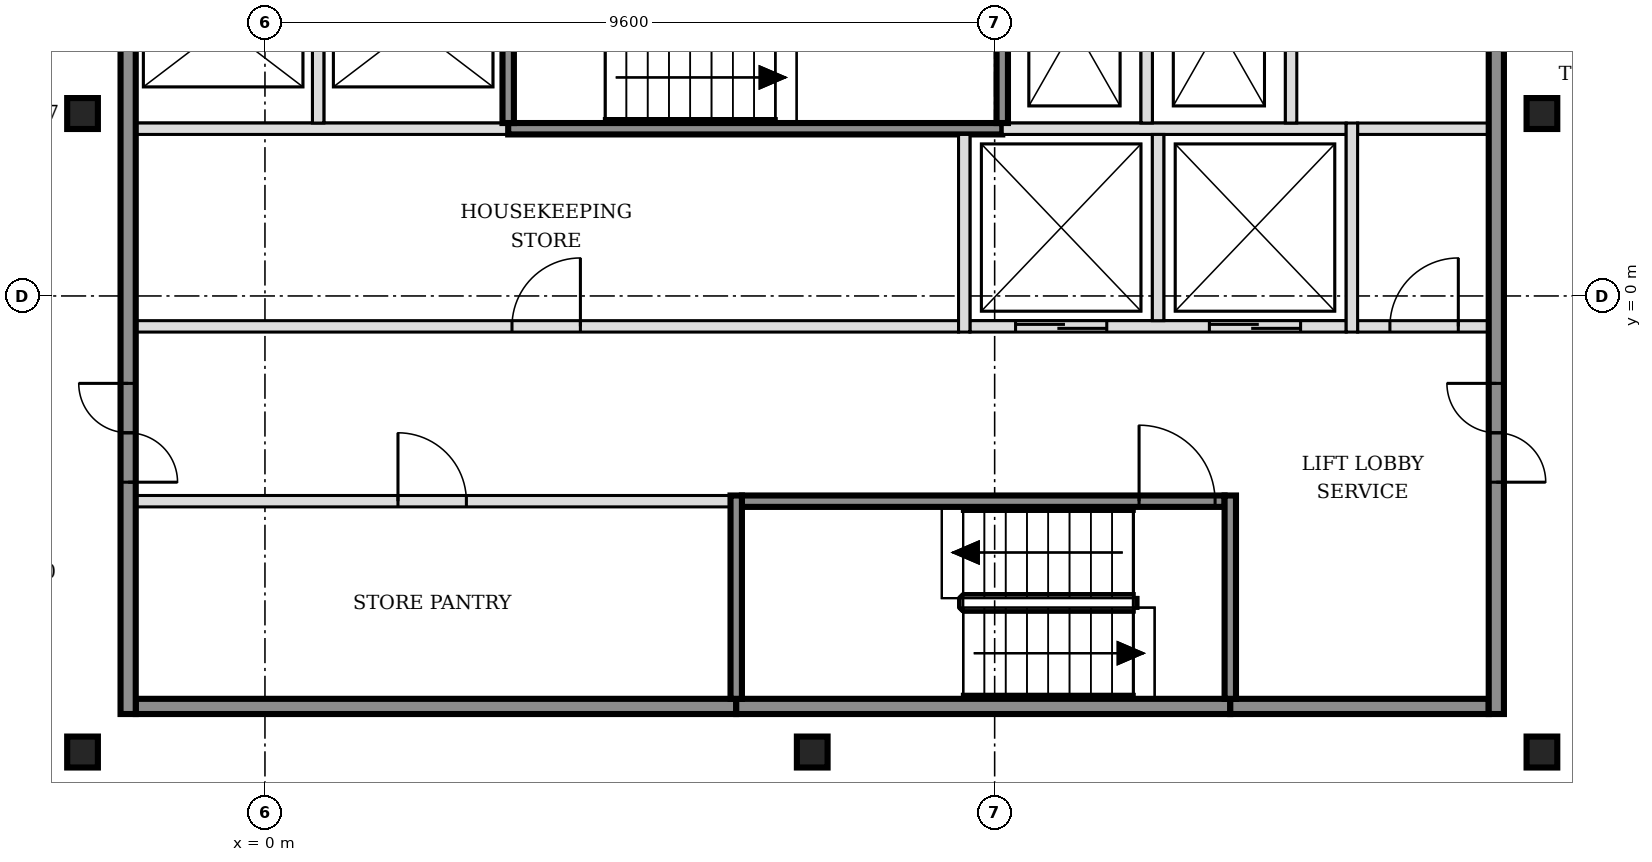
"""IFC4 building model, lengths in metres.
Left out: names, types, materials, properties, quantities, classifications, styles, units other than length and angle.
Written with IfcOpenShell. Run it as: python <this file> out.ifc"""

import sys

from ifc_helpers import new_model, si_unit, direction, frame, frame_2d, origin, origin_2d, place, context, subcontext, project, spatial, rectangle, i_section, extrude, element, fill, save


model = new_model("IFC4")
c1 = context("Model", 3, precision=1e-05, world=origin(), true_north=direction((0.0, 1.0)))
c2 = subcontext(c1, "Body", "Model", "MODEL_VIEW")
j1 = project(units=[si_unit("LENGTHUNIT", "METRE"), si_unit("PLANEANGLEUNIT", "RADIAN")], contexts=[c1])
p1 = place(None, origin())
s1 = spatial("IfcSite", under=j1, at=p1, CompositionType="ELEMENT")
p2 = place(p1, origin())
s2 = spatial("IfcBuilding", under=s1, at=p2, CompositionType="ELEMENT")
p3 = place(p2, frame((0.0, 0.0, 204.6)))
s3 = spatial("IfcBuildingStorey", under=s2, at=p3, CompositionType="ELEMENT", Elevation=204.6)
for number, where, z_axis, x_axis in (
    (1, (-2.4, -6.0, -0.25), (0.0, 0.0, 1.0), (1.0, 0.0, 0.0)),
    (2, (7.2, -6.0, -0.25), (0.0, 0.0, 1.0), (1.0, 0.0, 0.0)),
    (3, (16.8, -6.0, -0.25), (0.0, 0.0, 1.0), (1.0, 0.0, 0.0)),
    (4, (-2.4, 2.4, -0.25), (0.0, 0.0, 1.0), (1.0, 0.0, 0.0)),
    (5, (16.8, 2.4, -0.25), (0.0, 0.0, 1.0), (1.0, 0.0, 0.0)),
):
    element("IfcColumn", number, at=place(p3, frame(where, z_axis=z_axis, x_axis=x_axis)), inside=s3, PredefinedType="COLUMN", context=c2, shape_type="SweptSolid", body=[
        extrude(i_section(OverallWidth=0.404, OverallDepth=0.407, WebThickness=0.027, FlangeThickness=0.044, FilletRadius=0.015, at=origin_2d()), origin(), (0.0, 0.0, 1.0), 6.1),
    ])
p4 = place(p3, frame((-1.7, -5.4, 0.0), z_axis=(0.0, 0.0, 1.0), x_axis=(1.0, 0.0, 0.0)))
e6 = element("IfcWall", 6, at=p4, inside=s3, PredefinedType="SOLIDWALL", context=c2, shape_type="SweptSolid", body=[
    extrude(rectangle(XDim=7.9, YDim=0.2, at=frame_2d((3.95, 0.0))), origin(), (0.0, 0.0, 1.0), 5.85),
])
p5 = place(p3, frame((6.2, -5.4, 0.0), z_axis=(0.0, 0.0, 1.0), x_axis=(1.0, 0.0, 0.0)))
e7 = element("IfcWall", 7, at=p5, inside=s3, PredefinedType="SOLIDWALL", context=c2, shape_type="SweptSolid", body=[
    extrude(rectangle(XDim=6.5, YDim=0.2, at=frame_2d((3.25, 0.0))), origin(), (0.0, 0.0, 1.0), 5.85),
])
p6 = place(p3, frame((12.7, -5.4, 0.0), z_axis=(0.0, 0.0, 1.0), x_axis=(1.0, 0.0, 0.0)))
e8 = element("IfcWall", 8, at=p6, inside=s3, PredefinedType="SOLIDWALL", context=c2, shape_type="SweptSolid", body=[
    extrude(rectangle(XDim=3.4, YDim=0.2, at=frame_2d((1.7, 0.0))), origin(), (0.0, 0.0, 1.0), 5.85),
])
p7 = place(p3, frame((-1.7, -2.7, 0.0), z_axis=(0.0, 0.0, 1.0), x_axis=(1.0, 0.0, 0.0)))
e9 = element("IfcWall", 9, at=p7, inside=s3, PredefinedType="PARTITIONING", context=c2, shape_type="SweptSolid", body=[
    extrude(rectangle(XDim=7.825, YDim=0.15, at=frame_2d((3.913, 0.0))), origin(), (0.0, 0.0, 1.0), 5.85),
])
p8 = place(p7, frame((3.45, 0.0, 0.0)))
e10 = element("IfcOpeningElement", 10, at=p8, cuts=e9, PredefinedType="OPENING", context=c2, shape_type="SweptSolid", body=[
    extrude(rectangle(XDim=0.9, YDim=2.1, at=frame_2d((0.45, 1.05))), frame((0.0, 0.085, 0.0), z_axis=(0.0, -1.0, 0.0), x_axis=(1.0, 0.0, 0.0)), (0.0, 0.0, 1.0), 0.17),
])
p9 = place(p3, frame((6.275, -2.7, 0.0), z_axis=(0.0, 0.0, 1.0), x_axis=(1.0, 0.0, 0.0)))
e11 = element("IfcWall", 11, at=p9, inside=s3, PredefinedType="SOLIDWALL", context=c2, shape_type="SweptSolid", body=[
    extrude(rectangle(XDim=6.35, YDim=0.15, at=frame_2d((3.175, 0.0))), origin(), (0.0, 0.0, 1.0), 5.85),
])
p10 = place(p9, frame((5.225, 0.0, 0.0)))
e12 = element("IfcOpeningElement", 12, at=p10, cuts=e11, PredefinedType="OPENING", context=c2, shape_type="SweptSolid", body=[
    extrude(rectangle(XDim=1.0, YDim=2.1, at=frame_2d((0.5, 1.05))), frame((0.0, 0.085, 0.0), z_axis=(0.0, -1.0, 0.0), x_axis=(1.0, 0.0, 0.0)), (0.0, 0.0, 1.0), 0.17),
])
p11 = place(p3, frame((-1.7, -0.4, 0.0), z_axis=(0.0, 0.0, 1.0), x_axis=(1.0, 0.0, 0.0)))
e13 = element("IfcWall", 13, at=p11, inside=s3, PredefinedType="PARTITIONING", context=c2, shape_type="SweptSolid", body=[
    extrude(rectangle(XDim=10.825, YDim=0.15, at=frame_2d((5.413, 0.0))), origin(), (0.0, 0.0, 1.0), 5.85),
])
p12 = place(p11, frame((4.95, 0.0, 0.0)))
e14 = element("IfcOpeningElement", 14, at=p12, cuts=e13, PredefinedType="OPENING", context=c2, shape_type="SweptSolid", body=[
    extrude(rectangle(XDim=0.9, YDim=2.1, at=frame_2d((0.45, 1.05))), frame((0.0, 0.085, 0.0), z_axis=(0.0, -1.0, 0.0), x_axis=(1.0, 0.0, 0.0)), (0.0, 0.0, 1.0), 0.17),
])
p13 = place(p3, frame((9.275, -0.4, 0.0), z_axis=(0.0, 0.0, 1.0), x_axis=(1.0, 0.0, 0.0)))
e15 = element("IfcWall", 15, at=p13, inside=s3, PredefinedType="SOLIDWALL", context=c2, shape_type="SweptSolid", body=[
    extrude(rectangle(XDim=4.95, YDim=0.15, at=frame_2d((2.475, 0.0))), origin(), (0.0, 0.0, 1.0), 5.85),
])
p14 = place(p13, frame((0.6, 0.0, 0.0)))
e16 = element("IfcOpeningElement", 16, at=p14, cuts=e15, PredefinedType="OPENING", context=c2, shape_type="SweptSolid", body=[
    extrude(rectangle(XDim=1.2, YDim=2.1, at=frame_2d((0.6, 1.05))), frame((0.0, 0.085, 0.0), z_axis=(0.0, -1.0, 0.0), x_axis=(1.0, 0.0, 0.0)), (0.0, 0.0, 1.0), 0.17),
])
p15 = place(p13, frame((3.15, 0.0, 0.0)))
e17 = element("IfcOpeningElement", 17, at=p15, cuts=e15, PredefinedType="OPENING", context=c2, shape_type="SweptSolid", body=[
    extrude(rectangle(XDim=1.2, YDim=2.1, at=frame_2d((0.6, 1.05))), frame((0.0, 0.085, 0.0), z_axis=(0.0, -1.0, 0.0), x_axis=(1.0, 0.0, 0.0)), (0.0, 0.0, 1.0), 0.17),
])
p16 = place(p3, frame((14.375, -0.4, 0.0), z_axis=(0.0, 0.0, 1.0), x_axis=(1.0, 0.0, 0.0)))
e18 = element("IfcWall", 18, at=p16, inside=s3, PredefinedType="PARTITIONING", context=c2, shape_type="SweptSolid", body=[
    extrude(rectangle(XDim=1.725, YDim=0.15, at=frame_2d((0.863, 0.0))), origin(), (0.0, 0.0, 1.0), 5.85),
])
p17 = place(p16, frame((0.425, 0.0, 0.0)))
e19 = element("IfcOpeningElement", 19, at=p17, cuts=e18, PredefinedType="OPENING", context=c2, shape_type="SweptSolid", body=[
    extrude(rectangle(XDim=0.9, YDim=2.1, at=frame_2d((0.45, 1.05))), frame((0.0, 0.085, 0.0), z_axis=(0.0, -1.0, 0.0), x_axis=(1.0, 0.0, 0.0)), (0.0, 0.0, 1.0), 0.17),
])
p18 = place(p3, frame((-1.7, 2.2, 0.0), z_axis=(0.0, 0.0, 1.0), x_axis=(1.0, 0.0, 0.0)))
e20 = element("IfcWall", 20, at=p18, inside=s3, PredefinedType="SOLIDWALL", context=c2, shape_type="SweptSolid", body=[
    extrude(rectangle(XDim=4.9, YDim=0.15, at=frame_2d((2.45, 0.0))), origin(), (0.0, 0.0, 1.0), 5.85),
])
p19 = place(p3, frame((3.2, 2.2, 0.0), z_axis=(0.0, 0.0, 1.0), x_axis=(1.0, 0.0, 0.0)))
e21 = element("IfcWall", 21, at=p19, inside=s3, PredefinedType="SOLIDWALL", context=c2, shape_type="SweptSolid", body=[
    extrude(rectangle(XDim=6.5, YDim=0.15, at=frame_2d((3.25, 0.0))), origin(), (0.0, 0.0, 1.0), 5.85),
])
p20 = place(p3, frame((9.7, 2.2, 0.0), z_axis=(0.0, 0.0, 1.0), x_axis=(1.0, 0.0, 0.0)))
e22 = element("IfcWall", 22, at=p20, inside=s3, PredefinedType="SOLIDWALL", context=c2, shape_type="SweptSolid", body=[
    extrude(rectangle(XDim=4.525, YDim=0.15, at=frame_2d((2.263, 0.0))), origin(), (0.0, 0.0, 1.0), 5.85),
])
p21 = place(p3, frame((14.375, 2.2, 0.0), z_axis=(0.0, 0.0, 1.0), x_axis=(1.0, 0.0, 0.0)))
e23 = element("IfcWall", 23, at=p21, inside=s3, PredefinedType="PARTITIONING", context=c2, shape_type="SweptSolid", body=[
    extrude(rectangle(XDim=1.725, YDim=0.15, at=frame_2d((0.863, 0.0))), origin(), (0.0, 0.0, 1.0), 5.85),
])
p22 = place(p3, frame((-1.8, -5.5, 0.0), z_axis=(0.0, 0.0, 1.0), x_axis=(0.0, 1.0, 0.0)))
e24 = element("IfcWall", 24, at=p22, inside=s3, PredefinedType="SOLIDWALL", context=c2, shape_type="SweptSolid", body=[
    extrude(rectangle(XDim=15.8, YDim=0.2, at=frame_2d((7.9, 0.0))), origin(), (0.0, 0.0, 1.0), 5.85),
])
p23 = place(p22, frame((3.05, 0.0, 0.0)))
e25 = element("IfcOpeningElement", 25, at=p23, cuts=e24, PredefinedType="OPENING", context=c2, shape_type="SweptSolid", body=[
    extrude(rectangle(XDim=1.3, YDim=2.1, at=frame_2d((0.65, 1.05))), frame((0.0, 0.11, 0.0), z_axis=(0.0, -1.0, 0.0), x_axis=(1.0, 0.0, 0.0)), (0.0, 0.0, 1.0), 0.22),
])
p24 = place(p22, frame((11.45, 0.0, 0.0)))
e26 = element("IfcOpeningElement", 26, at=p24, cuts=e24, PredefinedType="OPENING", context=c2, shape_type="SweptSolid", body=[
    extrude(rectangle(XDim=1.3, YDim=2.1, at=frame_2d((0.65, 1.05))), frame((0.0, 0.11, 0.0), z_axis=(0.0, -1.0, 0.0), x_axis=(1.0, 0.0, 0.0)), (0.0, 0.0, 1.0), 0.22),
])
for number, where, z_axis, x_axis in (
    (27, (0.7, 2.275, 0.0), (0.0, 0.0, 1.0), (0.0, 1.0, 0.0)),
    (28, (3.2, 2.275, 0.0), (0.0, 0.0, 1.0), (0.0, 1.0, 0.0)),
):
    element("IfcWall", number, at=place(p3, frame(where, z_axis=z_axis, x_axis=x_axis)), inside=s3, PredefinedType="SOLIDWALL", context=c2, shape_type="SweptSolid", body=[
        extrude(rectangle(XDim=2.55, YDim=0.15, at=frame_2d((1.275, 0.0))), origin(), (0.0, 0.0, 1.0), 5.85),
    ])
p25 = place(p3, frame((6.2, -5.3, 0.0), z_axis=(0.0, 0.0, 1.0), x_axis=(0.0, 1.0, 0.0)))
e29 = element("IfcWall", 29, at=p25, inside=s3, PredefinedType="SOLIDWALL", context=c2, shape_type="SweptSolid", body=[
    extrude(rectangle(XDim=2.675, YDim=0.15, at=frame_2d((1.337, 0.0))), origin(), (0.0, 0.0, 1.0), 5.85),
])
p26 = place(p3, frame((9.2, -0.475, 0.0), z_axis=(0.0, 0.0, 1.0), x_axis=(0.0, 1.0, 0.0)))
e30 = element("IfcWall", 30, at=p26, inside=s3, PredefinedType="SOLIDWALL", context=c2, shape_type="SweptSolid", body=[
    extrude(rectangle(XDim=2.6, YDim=0.15, at=frame_2d((1.3, 0.0))), origin(), (0.0, 0.0, 1.0), 5.85),
])
for number, where, z_axis, x_axis in (
    (31, (9.7, 2.275, 0.0), (0.0, 0.0, 1.0), (0.0, 1.0, 0.0)),
    (32, (11.6, 2.275, 0.0), (0.0, 0.0, 1.0), (0.0, 1.0, 0.0)),
):
    element("IfcWall", number, at=place(p3, frame(where, z_axis=z_axis, x_axis=x_axis)), inside=s3, PredefinedType="SOLIDWALL", context=c2, shape_type="SweptSolid", body=[
        extrude(rectangle(XDim=2.55, YDim=0.15, at=frame_2d((1.275, 0.0))), origin(), (0.0, 0.0, 1.0), 5.85),
    ])
p27 = place(p3, frame((11.75, -0.325, 0.0), z_axis=(0.0, 0.0, 1.0), x_axis=(0.0, 1.0, 0.0)))
e33 = element("IfcWall", 33, at=p27, inside=s3, PredefinedType="SOLIDWALL", context=c2, shape_type="SweptSolid", body=[
    extrude(rectangle(XDim=2.45, YDim=0.15, at=frame_2d((1.225, 0.0))), origin(), (0.0, 0.0, 1.0), 5.85),
])
p28 = place(p3, frame((12.7, -5.3, 0.0), z_axis=(0.0, 0.0, 1.0), x_axis=(0.0, 1.0, 0.0)))
e34 = element("IfcWall", 34, at=p28, inside=s3, PredefinedType="SOLIDWALL", context=c2, shape_type="SweptSolid", body=[
    extrude(rectangle(XDim=2.675, YDim=0.15, at=frame_2d((1.337, 0.0))), origin(), (0.0, 0.0, 1.0), 5.85),
])
p29 = place(p3, frame((13.5, 2.275, 0.0), z_axis=(0.0, 0.0, 1.0), x_axis=(0.0, 1.0, 0.0)))
e35 = element("IfcWall", 35, at=p29, inside=s3, PredefinedType="SOLIDWALL", context=c2, shape_type="SweptSolid", body=[
    extrude(rectangle(XDim=2.55, YDim=0.15, at=frame_2d((1.275, 0.0))), origin(), (0.0, 0.0, 1.0), 5.85),
])
p30 = place(p3, frame((14.3, -0.475, 0.0), z_axis=(0.0, 0.0, 1.0), x_axis=(0.0, 1.0, 0.0)))
e36 = element("IfcWall", 36, at=p30, inside=s3, PredefinedType="SOLIDWALL", context=c2, shape_type="SweptSolid", body=[
    extrude(rectangle(XDim=2.75, YDim=0.15, at=frame_2d((1.375, 0.0))), origin(), (0.0, 0.0, 1.0), 5.85),
])
p31 = place(p3, frame((16.2, -5.5, 0.0), z_axis=(0.0, 0.0, 1.0), x_axis=(0.0, 1.0, 0.0)))
e37 = element("IfcWall", 37, at=p31, inside=s3, PredefinedType="SOLIDWALL", context=c2, shape_type="SweptSolid", body=[
    extrude(rectangle(XDim=15.8, YDim=0.2, at=frame_2d((7.9, 0.0))), origin(), (0.0, 0.0, 1.0), 5.85),
])
p32 = place(p31, frame((3.05, 0.0, 0.0)))
e38 = element("IfcOpeningElement", 38, at=p32, cuts=e37, PredefinedType="OPENING", context=c2, shape_type="SweptSolid", body=[
    extrude(rectangle(XDim=1.3, YDim=2.1, at=frame_2d((0.65, 1.05))), frame((0.0, 0.11, 0.0), z_axis=(0.0, -1.0, 0.0), x_axis=(1.0, 0.0, 0.0)), (0.0, 0.0, 1.0), 0.22),
])
p33 = place(p31, frame((11.45, 0.0, 0.0)))
e39 = element("IfcOpeningElement", 39, at=p33, cuts=e37, PredefinedType="OPENING", context=c2, shape_type="SweptSolid", body=[
    extrude(rectangle(XDim=1.3, YDim=2.1, at=frame_2d((0.65, 1.05))), frame((0.0, 0.11, 0.0), z_axis=(0.0, -1.0, 0.0), x_axis=(1.0, 0.0, 0.0)), (0.0, 0.0, 1.0), 0.22),
])
p34 = place(p14, origin())
e40 = element("IfcDoor", 40, at=p34, inside=s3, OperationType="DOUBLE_DOOR_SLIDING", PredefinedType="DOOR", context=c2, shape_type="SweptSolid", body=[
    extrude(rectangle(XDim=1.2, YDim=2.1, at=frame_2d((0.6, 1.05))), frame((0.0, 0.025, 0.0), z_axis=(0.0, -1.0, 0.0), x_axis=(1.0, 0.0, 0.0)), (0.0, 0.0, 1.0), 0.05),
])
fill(e16, e40)
p35 = place(p15, origin())
e41 = element("IfcDoor", 41, at=p35, inside=s3, OperationType="DOUBLE_DOOR_SLIDING", PredefinedType="DOOR", context=c2, shape_type="SweptSolid", body=[
    extrude(rectangle(XDim=1.2, YDim=2.1, at=frame_2d((0.6, 1.05))), frame((0.0, 0.025, 0.0), z_axis=(0.0, -1.0, 0.0), x_axis=(1.0, 0.0, 0.0)), (0.0, 0.0, 1.0), 0.05),
])
fill(e17, e41)
p36 = place(p10, origin())
e42 = element("IfcDoor", 42, at=p36, inside=s3, OperationType="SINGLE_SWING_LEFT", PredefinedType="DOOR", context=c2, shape_type="SweptSolid", body=[
    extrude(rectangle(XDim=1.0, YDim=2.1, at=frame_2d((0.5, 1.05))), frame((0.0, 0.025, 0.0), z_axis=(0.0, -1.0, 0.0), x_axis=(1.0, 0.0, 0.0)), (0.0, 0.0, 1.0), 0.05),
])
fill(e12, e42)
p37 = place(p23, origin())
e43 = element("IfcDoor", 43, at=p37, inside=s3, OperationType="DOUBLE_DOOR_SINGLE_SWING", PredefinedType="DOOR", context=c2, shape_type="SweptSolid", body=[
    extrude(rectangle(XDim=1.3, YDim=2.1, at=frame_2d((0.65, 1.05))), frame((0.0, 0.025, 0.0), z_axis=(0.0, -1.0, 0.0), x_axis=(1.0, 0.0, 0.0)), (0.0, 0.0, 1.0), 0.05),
])
fill(e25, e43)
p38 = place(p32, origin())
e44 = element("IfcDoor", 44, at=p38, inside=s3, OperationType="DOUBLE_DOOR_SINGLE_SWING", PredefinedType="DOOR", context=c2, shape_type="SweptSolid", body=[
    extrude(rectangle(XDim=1.3, YDim=2.1, at=frame_2d((0.65, 1.05))), frame((0.0, 0.025, 0.0), z_axis=(0.0, -1.0, 0.0), x_axis=(1.0, 0.0, 0.0)), (0.0, 0.0, 1.0), 0.05),
])
fill(e38, e44)
p39 = place(p17, origin())
e45 = element("IfcDoor", 45, at=p39, inside=s3, OperationType="SINGLE_SWING_RIGHT", PredefinedType="DOOR", context=c2, shape_type="SweptSolid", body=[
    extrude(rectangle(XDim=0.9, YDim=2.1, at=frame_2d((0.45, 1.05))), frame((0.0, 0.025, 0.0), z_axis=(0.0, -1.0, 0.0), x_axis=(1.0, 0.0, 0.0)), (0.0, 0.0, 1.0), 0.05),
])
fill(e19, e45)
p40 = place(p8, origin())
e46 = element("IfcDoor", 46, at=p40, inside=s3, OperationType="SINGLE_SWING_LEFT", PredefinedType="DOOR", context=c2, shape_type="SweptSolid", body=[
    extrude(rectangle(XDim=0.9, YDim=2.1, at=frame_2d((0.45, 1.05))), frame((0.0, 0.025, 0.0), z_axis=(0.0, -1.0, 0.0), x_axis=(1.0, 0.0, 0.0)), (0.0, 0.0, 1.0), 0.05),
])
fill(e10, e46)
p41 = place(p12, origin())
e47 = element("IfcDoor", 47, at=p41, inside=s3, OperationType="SINGLE_SWING_RIGHT", PredefinedType="DOOR", context=c2, shape_type="SweptSolid", body=[
    extrude(rectangle(XDim=0.9, YDim=2.1, at=frame_2d((0.45, 1.05))), frame((0.0, 0.025, 0.0), z_axis=(0.0, -1.0, 0.0), x_axis=(1.0, 0.0, 0.0)), (0.0, 0.0, 1.0), 0.05),
])
fill(e14, e47)
save(model, sys.argv[1])
